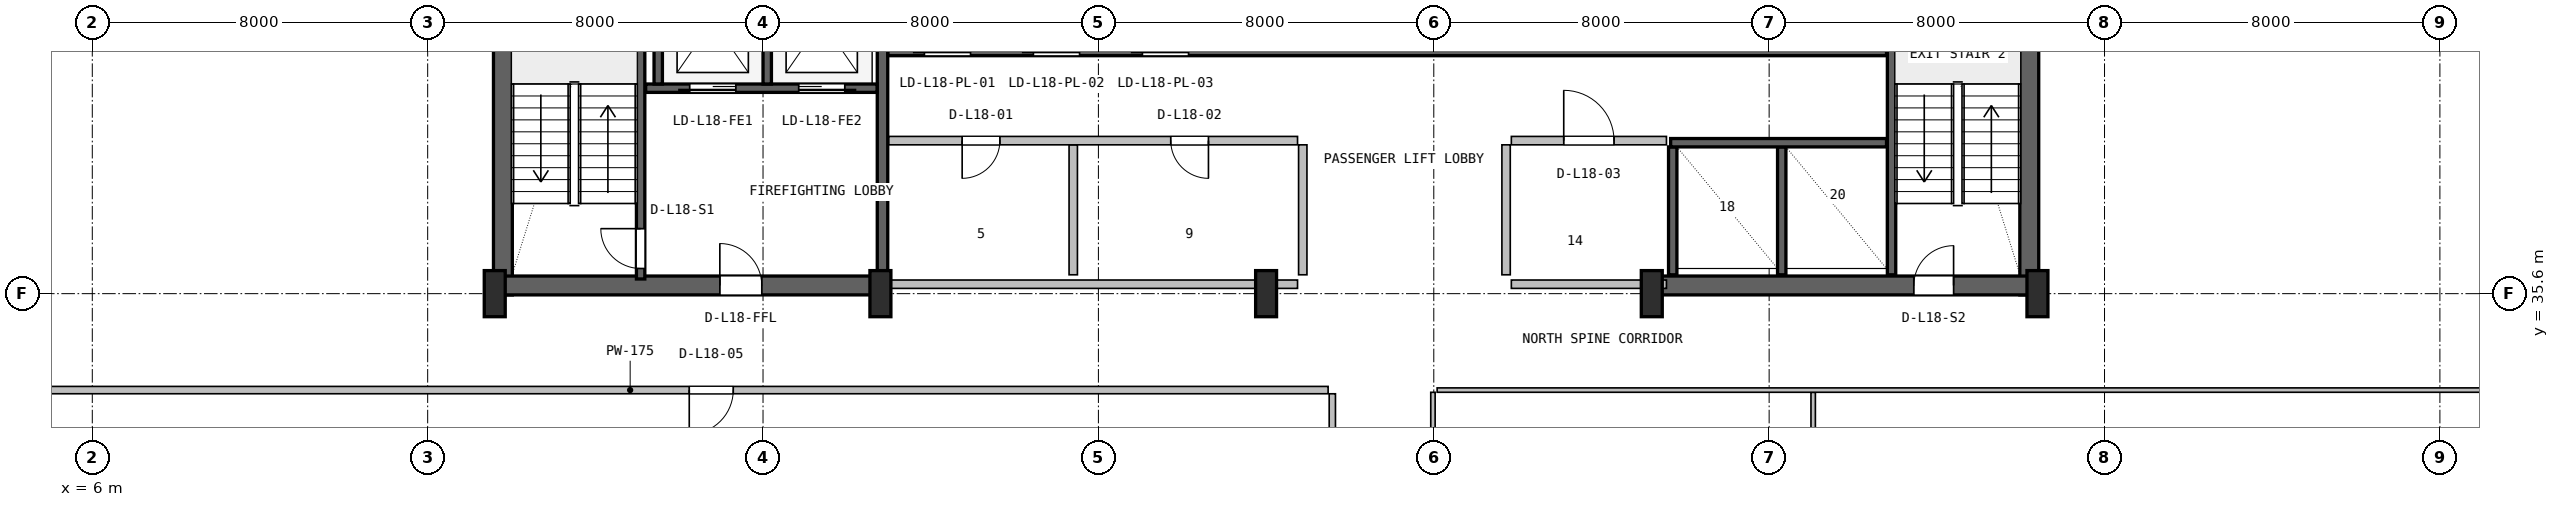
"""IFC4 building model, lengths in metres.
Left out: names, types, materials, properties, quantities, classifications, styles, units other than length and angle.
Written with IfcOpenShell. Run it as: python <this file> out.ifc"""

import sys

from ifc_helpers import new_model, si_unit, direction, frame, frame_2d, origin, origin_2d, place, context, subcontext, project, spatial, rectangle, i_section, extrude, source, transform, mapped, element, fill, save


model = new_model("IFC4")
c1 = context("Model", 3, precision=1e-05, world=origin(), true_north=direction((0.0, 1.0)))
c2 = subcontext(c1, "Body", "Model", "MODEL_VIEW")
j1 = project(units=[si_unit("LENGTHUNIT", "METRE"), si_unit("PLANEANGLEUNIT", "RADIAN")], contexts=[c1])
p1 = place(None, origin())
s1 = spatial("IfcSite", under=j1, at=p1, CompositionType="ELEMENT")
p2 = place(p1, origin())
s2 = spatial("IfcBuilding", under=s1, at=p2, CompositionType="ELEMENT")
p3 = place(p2, frame((0.0, 0.0, 78.3)))
s3 = spatial("IfcBuildingStorey", under=s2, at=p3, CompositionType="ELEMENT", Elevation=78.3)
for number, where, z_axis, x_axis in (
    (1, (15.795, 35.57, 0.0), (0.0, 0.0, 1.0), (0.0, 1.0, 0.0)),
    (2, (52.205, 35.57, 0.0), (0.0, 0.0, 1.0), (0.0, 1.0, 0.0)),
):
    element("IfcWall", number, at=place(p3, frame(where, z_axis=z_axis, x_axis=x_axis)), inside=s3, PredefinedType="SHEAR", context=c2, shape_type="SweptSolid", body=[
        extrude(rectangle(XDim=11.23, YDim=0.45, at=frame_2d((5.615, 0.0))), origin(), (0.0, 0.0, 1.0), 3.58),
    ])
p4 = place(p3, frame((15.57, 35.795, 0.0), z_axis=(0.0, 0.0, 1.0), x_axis=(1.0, 0.0, 0.0)))
e3 = element("IfcWall", 3, at=p4, inside=s3, PredefinedType="SHEAR", context=c2, shape_type="SweptSolid", body=[
    extrude(rectangle(XDim=9.23, YDim=0.45, at=frame_2d((4.615, 0.0))), origin(), (0.0, 0.0, 1.0), 3.58),
])
p5 = place(p4, frame((5.4, 0.0, 0.0)))
e4 = element("IfcOpeningElement", 4, at=p5, cuts=e3, PredefinedType="OPENING", context=c2, shape_type="SweptSolid", body=[
    extrude(rectangle(XDim=1.0, YDim=2.1, at=frame_2d((0.5, 1.05))), frame((0.0, 0.235, 0.0), z_axis=(0.0, -1.0, 0.0), x_axis=(1.0, 0.0, 0.0)), (0.0, 0.0, 1.0), 0.47),
])
p6 = place(p3, frame((43.2, 35.795, 0.0), z_axis=(0.0, 0.0, 1.0), x_axis=(1.0, 0.0, 0.0)))
e5 = element("IfcWall", 5, at=p6, inside=s3, PredefinedType="SHEAR", context=c2, shape_type="SweptSolid", body=[
    extrude(rectangle(XDim=9.23, YDim=0.45, at=frame_2d((4.615, 0.0))), origin(), (0.0, 0.0, 1.0), 3.58),
])
p7 = place(p6, frame((6.25, 0.0, 0.0)))
e6 = element("IfcOpeningElement", 6, at=p7, cuts=e5, PredefinedType="OPENING", context=c2, shape_type="SweptSolid", body=[
    extrude(rectangle(XDim=0.95, YDim=2.1, at=frame_2d((0.475, 1.05))), frame((0.0, 0.235, 0.0), z_axis=(0.0, -1.0, 0.0), x_axis=(1.0, 0.0, 0.0)), (0.0, 0.0, 1.0), 0.47),
])
m1 = source(origin(), c2, "Body", "SweptSolid", [
    extrude(i_section(OverallWidth=0.5, OverallDepth=1.1, WebThickness=0.018, FlangeThickness=0.032, FilletRadius=0.018, at=origin_2d()), origin(), (0.0, 0.0, 1.0), 3.9),
])
for number, where, z_axis, x_axis in (
    (7, (15.6, 35.6, 0.0), (0.0, 0.0, 1.0), (1.0, 0.0, 0.0)),
    (8, (24.8, 35.6, 0.0), (0.0, 0.0, 1.0), (1.0, 0.0, 0.0)),
    (9, (34.0, 35.6, 0.0), (0.0, 0.0, 1.0), (1.0, 0.0, 0.0)),
    (10, (43.2, 35.6, 0.0), (0.0, 0.0, 1.0), (1.0, 0.0, 0.0)),
    (11, (52.4, 35.6, 0.0), (0.0, 0.0, 1.0), (1.0, 0.0, 0.0)),
):
    element("IfcColumn", number, at=place(p3, frame(where, z_axis=z_axis, x_axis=x_axis)), inside=s3, PredefinedType="COLUMN", context=c2, shape_type="MappedRepresentation", body=[
        mapped(m1, transform((0.0, 0.0, 0.0), x_axis=(1.0, 0.0, 0.0), y_axis=(0.0, 1.0, 0.0), z_axis=(0.0, 0.0, 1.0), scale=1.0)),
    ])
p8 = place(p3, frame((19.08, 35.95, 0.0), z_axis=(0.0, 0.0, 1.0), x_axis=(0.0, 1.0, 0.0)))
e12 = element("IfcWall", 12, at=p8, inside=s3, PredefinedType="SHEAR", context=c2, shape_type="SweptSolid", body=[
    extrude(rectangle(XDim=9.65, YDim=0.2, at=frame_2d((4.825, 0.0))), origin(), (0.0, 0.0, 1.0), 3.58),
])
p9 = place(p8, frame((0.25, 0.0, 0.0)))
e13 = element("IfcOpeningElement", 13, at=p9, cuts=e12, PredefinedType="OPENING", context=c2, shape_type="SweptSolid", body=[
    extrude(rectangle(XDim=0.95, YDim=2.1, at=frame_2d((0.475, 1.05))), frame((0.0, 0.11, 0.0), z_axis=(0.0, -1.0, 0.0), x_axis=(1.0, 0.0, 0.0)), (0.0, 0.0, 1.0), 0.22),
])
p10 = place(p3, frame((24.85, 36.05, 0.0), z_axis=(0.0, 0.0, 1.0), x_axis=(0.0, 1.0, 0.0)))
e14 = element("IfcWall", 14, at=p10, inside=s3, PredefinedType="SHEAR", context=c2, shape_type="SweptSolid", body=[
    extrude(rectangle(XDim=10.45, YDim=0.25, at=frame_2d((5.225, 0.0))), origin(), (0.0, 0.0, 1.0), 3.58),
])
p11 = place(p3, frame((19.2, 40.5, 0.0), z_axis=(0.0, 0.0, 1.0), x_axis=(1.0, 0.0, 0.0)))
e15 = element("IfcWall", 15, at=p11, inside=s3, PredefinedType="SHEAR", context=c2, shape_type="SweptSolid", body=[
    extrude(rectangle(XDim=5.52, YDim=0.2, at=frame_2d((2.76, 0.0))), origin(), (0.0, 0.0, 1.0), 3.58),
])
p12 = place(p11, frame((1.05, 0.0, 0.0)))
e16 = element("IfcOpeningElement", 16, at=p12, cuts=e15, PredefinedType="OPENING", context=c2, shape_type="SweptSolid", body=[
    extrude(rectangle(XDim=1.1, YDim=2.18, at=frame_2d((0.55, 1.09))), frame((0.0, 0.11, 0.0), z_axis=(0.0, -1.0, 0.0), x_axis=(1.0, 0.0, 0.0)), (0.0, 0.0, 1.0), 0.22),
])
p13 = place(p11, frame((3.65, 0.0, 0.0)))
e17 = element("IfcOpeningElement", 17, at=p13, cuts=e15, PredefinedType="OPENING", context=c2, shape_type="SweptSolid", body=[
    extrude(rectangle(XDim=1.1, YDim=2.18, at=frame_2d((0.55, 1.09))), frame((0.0, 0.11, 0.0), z_axis=(0.0, -1.0, 0.0), x_axis=(1.0, 0.0, 0.0)), (0.0, 0.0, 1.0), 0.22),
])
p14 = place(p3, frame((22.1, 40.6, 0.0), z_axis=(0.0, 0.0, 1.0), x_axis=(0.0, 1.0, 0.0)))
e18 = element("IfcWall", 18, at=p14, inside=s3, PredefinedType="SHEAR", context=c2, shape_type="SweptSolid", body=[
    extrude(rectangle(XDim=3.0, YDim=0.2, at=frame_2d((1.5, 0.0))), origin(), (0.0, 0.0, 1.0), 3.58),
])
p15 = place(p3, frame((19.5, 40.6, 0.0), z_axis=(0.0, 0.0, 1.0), x_axis=(0.0, 1.0, 0.0)))
e19 = element("IfcWall", 19, at=p15, inside=s3, PredefinedType="SHEAR", context=c2, shape_type="SweptSolid", body=[
    extrude(rectangle(XDim=5.95, YDim=0.2, at=frame_2d((2.975, 0.0))), origin(), (0.0, 0.0, 1.0), 3.58),
])
p16 = place(p3, frame((48.92, 36.05, 0.0), z_axis=(0.0, 0.0, 1.0), x_axis=(0.0, 1.0, 0.0)))
e20 = element("IfcWall", 20, at=p16, inside=s3, PredefinedType="SHEAR", context=c2, shape_type="SweptSolid", body=[
    extrude(rectangle(XDim=10.5, YDim=0.2, at=frame_2d((5.25, 0.0))), origin(), (0.0, 0.0, 1.0), 3.58),
])
p17 = place(p3, frame((24.98, 41.4, 0.0), z_axis=(0.0, 0.0, 1.0), x_axis=(1.0, 0.0, 0.0)))
e21 = element("IfcWall", 21, at=p17, inside=s3, PredefinedType="SHEAR", context=c2, shape_type="SweptSolid", body=[
    extrude(rectangle(XDim=23.82, YDim=0.25, at=frame_2d((11.91, 0.0))), origin(), (0.0, 0.0, 1.0), 3.58),
])
p18 = place(p17, frame((0.87, 0.0, 0.0)))
e22 = element("IfcOpeningElement", 22, at=p18, cuts=e21, PredefinedType="OPENING", context=c2, shape_type="SweptSolid", body=[
    extrude(rectangle(XDim=1.1, YDim=2.18, at=frame_2d((0.55, 1.09))), frame((0.0, 0.135, 0.0), z_axis=(0.0, -1.0, 0.0), x_axis=(1.0, 0.0, 0.0)), (0.0, 0.0, 1.0), 0.27),
])
p19 = place(p17, frame((3.47, 0.0, 0.0)))
e23 = element("IfcOpeningElement", 23, at=p19, cuts=e21, PredefinedType="OPENING", context=c2, shape_type="SweptSolid", body=[
    extrude(rectangle(XDim=1.1, YDim=2.18, at=frame_2d((0.55, 1.09))), frame((0.0, 0.135, 0.0), z_axis=(0.0, -1.0, 0.0), x_axis=(1.0, 0.0, 0.0)), (0.0, 0.0, 1.0), 0.27),
])
p20 = place(p17, frame((6.07, 0.0, 0.0)))
e24 = element("IfcOpeningElement", 24, at=p20, cuts=e21, PredefinedType="OPENING", context=c2, shape_type="SweptSolid", body=[
    extrude(rectangle(XDim=1.1, YDim=2.18, at=frame_2d((0.55, 1.09))), frame((0.0, 0.135, 0.0), z_axis=(0.0, -1.0, 0.0), x_axis=(1.0, 0.0, 0.0)), (0.0, 0.0, 1.0), 0.27),
])
for number, where, z_axis, x_axis in (
    (25, (43.7, 36.05, 0.0), (0.0, 0.0, 1.0), (0.0, 1.0, 0.0)),
    (26, (46.3, 36.05, 0.0), (0.0, 0.0, 1.0), (0.0, 1.0, 0.0)),
):
    element("IfcWall", number, at=place(p3, frame(where, z_axis=z_axis, x_axis=x_axis)), inside=s3, PredefinedType="SHEAR", context=c2, shape_type="SweptSolid", body=[
        extrude(rectangle(XDim=3.05, YDim=0.2, at=frame_2d((1.525, 0.0))), origin(), (0.0, 0.0, 1.0), 3.58),
    ])
p21 = place(p3, frame((43.65, 39.2, 0.0), z_axis=(0.0, 0.0, 1.0), x_axis=(1.0, 0.0, 0.0)))
e27 = element("IfcWall", 27, at=p21, inside=s3, PredefinedType="SHEAR", context=c2, shape_type="SweptSolid", body=[
    extrude(rectangle(XDim=5.15, YDim=0.2, at=frame_2d((2.575, 0.0))), origin(), (0.0, 0.0, 1.0), 3.58),
])
p22 = place(p3, frame((25.0, 35.825, 0.0), z_axis=(0.0, 0.0, 1.0), x_axis=(1.0, 0.0, 0.0)))
e28 = element("IfcWall", 28, at=p22, inside=s3, PredefinedType="PLUMBINGWALL", context=c2, shape_type="SweptSolid", body=[
    extrude(rectangle(XDim=9.75, YDim=0.2, at=frame_2d((4.875, 0.0))), origin(), (0.0, 0.0, 1.0), 2.355),
])
p23 = place(p3, frame((29.4, 36.05, 0.0), z_axis=(0.0, 0.0, 1.0), x_axis=(0.0, 1.0, 0.0)))
e29 = element("IfcWall", 29, at=p23, inside=s3, PredefinedType="PLUMBINGWALL", context=c2, shape_type="SweptSolid", body=[
    extrude(rectangle(XDim=3.1, YDim=0.2, at=frame_2d((1.55, 0.0))), origin(), (0.0, 0.0, 1.0), 3.56),
])
p24 = place(p3, frame((25.0, 39.25, 0.0), z_axis=(0.0, 0.0, 1.0), x_axis=(1.0, 0.0, 0.0)))
e30 = element("IfcWall", 30, at=p24, inside=s3, PredefinedType="PLUMBINGWALL", context=c2, shape_type="SweptSolid", body=[
    extrude(rectangle(XDim=9.75, YDim=0.2, at=frame_2d((4.875, 0.0))), origin(), (0.0, 0.0, 1.0), 3.56),
])
p25 = place(p24, frame((1.75, 0.0, 0.0)))
e31 = element("IfcOpeningElement", 31, at=p25, cuts=e30, PredefinedType="OPENING", context=c2, shape_type="SweptSolid", body=[
    extrude(rectangle(XDim=0.9, YDim=2.06, at=frame_2d((0.45, 1.03))), frame((0.0, 0.11, 0.0), z_axis=(0.0, -1.0, 0.0), x_axis=(1.0, 0.0, 0.0)), (0.0, 0.0, 1.0), 0.22),
])
p26 = place(p24, frame((6.725, 0.0, 0.0)))
e32 = element("IfcOpeningElement", 32, at=p26, cuts=e30, PredefinedType="OPENING", context=c2, shape_type="SweptSolid", body=[
    extrude(rectangle(XDim=0.9, YDim=2.06, at=frame_2d((0.45, 1.03))), frame((0.0, 0.11, 0.0), z_axis=(0.0, -1.0, 0.0), x_axis=(1.0, 0.0, 0.0)), (0.0, 0.0, 1.0), 0.22),
])
p27 = place(p3, frame((34.875, 36.05, 0.0), z_axis=(0.0, 0.0, 1.0), x_axis=(0.0, 1.0, 0.0)))
e33 = element("IfcWall", 33, at=p27, inside=s3, PredefinedType="PLUMBINGWALL", context=c2, shape_type="SweptSolid", body=[
    extrude(rectangle(XDim=3.1, YDim=0.2, at=frame_2d((1.55, 0.0))), origin(), (0.0, 0.0, 1.0), 3.56),
])
p28 = place(p3, frame((39.85, 35.825, 0.0), z_axis=(0.0, 0.0, 1.0), x_axis=(1.0, 0.0, 0.0)))
e34 = element("IfcWall", 34, at=p28, inside=s3, PredefinedType="SOLIDWALL", context=c2, shape_type="SweptSolid", body=[
    extrude(rectangle(XDim=3.7, YDim=0.2, at=frame_2d((1.85, 0.0))), origin(), (0.0, 0.0, 1.0), 2.355),
])
p29 = place(p3, frame((39.85, 39.25, 0.0), z_axis=(0.0, 0.0, 1.0), x_axis=(1.0, 0.0, 0.0)))
e35 = element("IfcWall", 35, at=p29, inside=s3, PredefinedType="SOLIDWALL", context=c2, shape_type="SweptSolid", body=[
    extrude(rectangle(XDim=3.7, YDim=0.2, at=frame_2d((1.85, 0.0))), origin(), (0.0, 0.0, 1.0), 3.56),
])
p30 = place(p29, frame((1.25, 0.0, 0.0)))
e36 = element("IfcOpeningElement", 36, at=p30, cuts=e35, PredefinedType="OPENING", context=c2, shape_type="SweptSolid", body=[
    extrude(rectangle(XDim=1.2, YDim=2.1, at=frame_2d((0.6, 1.05))), frame((0.0, 0.11, 0.0), z_axis=(0.0, -1.0, 0.0), x_axis=(1.0, 0.0, 0.0)), (0.0, 0.0, 1.0), 0.22),
])
p31 = place(p3, frame((39.725, 36.05, 0.0), z_axis=(0.0, 0.0, 1.0), x_axis=(0.0, 1.0, 0.0)))
e37 = element("IfcWall", 37, at=p31, inside=s3, PredefinedType="SOLIDWALL", context=c2, shape_type="SweptSolid", body=[
    extrude(rectangle(XDim=3.1, YDim=0.2, at=frame_2d((1.55, 0.0))), origin(), (0.0, 0.0, 1.0), 3.56),
])
p32 = place(p3, frame((35.58, 1.38, 0.0), z_axis=(0.0, 0.0, 1.0), x_axis=(0.0, 1.0, 0.0)))
e38 = element("IfcWall", 38, at=p32, inside=s3, PredefinedType="PARTITIONING", context=c2, shape_type="SweptSolid", body=[
    extrude(rectangle(XDim=31.832, YDim=0.15, at=frame_2d((15.916, 0.0))), origin(), (0.0, 0.0, 1.0), 2.782),
])
p33 = place(p32, frame((9.985, 0.0, 0.0)))
e39 = element("IfcOpeningElement", 39, at=p33, cuts=e38, PredefinedType="OPENING", context=c2, shape_type="SweptSolid", body=[
    extrude(rectangle(XDim=0.92, YDim=2.08, at=frame_2d((0.46, 1.04))), frame((0.0, 0.085, 0.0), z_axis=(0.0, -1.0, 0.0), x_axis=(1.0, 0.0, 0.0)), (0.0, 0.0, 1.0), 0.17),
])
p34 = place(p3, frame((2.18, 33.3, 0.0), z_axis=(0.0, 0.0, 1.0), x_axis=(1.0, 0.0, 0.0)))
e40 = element("IfcWall", 40, at=p34, inside=s3, PredefinedType="PARTITIONING", context=c2, shape_type="SweptSolid", body=[
    extrude(rectangle(XDim=33.3, YDim=0.175, at=frame_2d((16.65, 0.0))), origin(), (0.0, 0.0, 1.0), 2.782),
])
p35 = place(p34, frame((18.06, 0.0, 0.0)))
e41 = element("IfcOpeningElement", 41, at=p35, cuts=e40, PredefinedType="OPENING", context=c2, shape_type="SweptSolid", body=[
    extrude(rectangle(XDim=1.05, YDim=2.1, at=frame_2d((0.525, 1.05))), frame((0.0, 0.098, 0.0), z_axis=(0.0, -1.0, 0.0), x_axis=(1.0, 0.0, 0.0)), (0.0, 0.0, 1.0), 0.195),
])
p36 = place(p3, frame((47.05, 16.912, 0.0), z_axis=(0.0, 0.0, 1.0), x_axis=(0.0, 1.0, 0.0)))
e42 = element("IfcWall", 42, at=p36, inside=s3, PredefinedType="PARTITIONING", context=c2, shape_type="SweptSolid", body=[
    extrude(rectangle(XDim=16.335, YDim=0.105, at=frame_2d((8.167, 0.0))), origin(), (0.0, 0.0, 1.0), 3.252),
])
p37 = place(p3, frame((38.08, 33.3, 0.0), z_axis=(0.0, 0.0, 1.0), x_axis=(1.0, 0.0, 0.0)))
e43 = element("IfcWall", 43, at=p37, inside=s3, PredefinedType="PARTITIONING", context=c2, shape_type="SweptSolid", body=[
    extrude(rectangle(XDim=27.74, YDim=0.105, at=frame_2d((13.87, 0.0))), origin(), (0.0, 0.0, 1.0), 2.782),
])
p38 = place(p3, frame((37.98, 16.912, 0.0), z_axis=(0.0, 0.0, 1.0), x_axis=(0.0, 1.0, 0.0)))
e44 = element("IfcWall", 44, at=p38, inside=s3, PredefinedType="PARTITIONING", context=c2, shape_type="SweptSolid", body=[
    extrude(rectangle(XDim=16.335, YDim=0.105, at=frame_2d((8.167, 0.0))), origin(), (0.0, 0.0, 1.0), 2.782),
])
p39 = place(p38, frame((7.728, 0.0, 0.0)))
e45 = element("IfcOpeningElement", 45, at=p39, cuts=e44, PredefinedType="OPENING", context=c2, shape_type="SweptSolid", body=[
    extrude(rectangle(XDim=0.88, YDim=2.06, at=frame_2d((0.44, 1.03))), frame((0.0, 0.062, 0.0), z_axis=(0.0, -1.0, 0.0), x_axis=(1.0, 0.0, 0.0)), (0.0, 0.0, 1.0), 0.125),
])
m2 = source(origin(), c2, "Body", "SweptSolid", [
    extrude(rectangle(XDim=0.95, YDim=2.1, at=frame_2d((0.475, 1.05))), frame((0.0, 0.025, 0.0), z_axis=(0.0, -1.0, 0.0), x_axis=(1.0, 0.0, 0.0)), (0.0, 0.0, 1.0), 0.05),
])
p40 = place(p9, origin())
e46 = element("IfcDoor", 46, at=p40, inside=s3, OperationType="SINGLE_SWING_RIGHT", PredefinedType="DOOR", context=c2, shape_type="MappedRepresentation", body=[
    mapped(m2, transform((0.0, 0.0, 0.0), x_axis=(1.0, 0.0, 0.0), y_axis=(0.0, 1.0, 0.0), z_axis=(0.0, 0.0, 1.0), scale=1.0)),
])
fill(e13, e46)
m3 = source(origin(), c2, "Body", "SweptSolid", [
    extrude(rectangle(XDim=1.0, YDim=2.1, at=frame_2d((0.5, 1.05))), frame((0.0, 0.025, 0.0), z_axis=(0.0, -1.0, 0.0), x_axis=(1.0, 0.0, 0.0)), (0.0, 0.0, 1.0), 0.05),
])
p41 = place(p5, origin())
e47 = element("IfcDoor", 47, at=p41, inside=s3, OperationType="SINGLE_SWING_LEFT", PredefinedType="DOOR", context=c2, shape_type="MappedRepresentation", body=[
    mapped(m3, transform((0.0, 0.0, 0.0), x_axis=(1.0, 0.0, 0.0), y_axis=(0.0, 1.0, 0.0), z_axis=(0.0, 0.0, 1.0), scale=1.0)),
])
fill(e4, e47)
m4 = source(origin(), c2, "Body", "SweptSolid", [
    extrude(rectangle(XDim=1.1, YDim=2.18, at=frame_2d((0.55, 1.09))), frame((0.0, 0.025, 0.0), z_axis=(0.0, -1.0, 0.0), x_axis=(1.0, 0.0, 0.0)), (0.0, 0.0, 1.0), 0.05),
])
p42 = place(p12, frame((1.1, 0.0, 0.0), z_axis=(0.0, 0.0, 1.0), x_axis=(-1.0, 0.0, 0.0)))
e48 = element("IfcDoor", 48, at=p42, inside=s3, OperationType="SLIDING_TO_LEFT", PredefinedType="DOOR", context=c2, shape_type="MappedRepresentation", body=[
    mapped(m4, transform((0.0, 0.0, 0.0), x_axis=(1.0, 0.0, 0.0), y_axis=(0.0, 1.0, 0.0), z_axis=(0.0, 0.0, 1.0), scale=1.0)),
])
fill(e16, e48)
p43 = place(p13, frame((1.1, 0.0, 0.0), z_axis=(0.0, 0.0, 1.0), x_axis=(-1.0, 0.0, 0.0)))
e49 = element("IfcDoor", 49, at=p43, inside=s3, OperationType="SLIDING_TO_RIGHT", PredefinedType="DOOR", context=c2, shape_type="MappedRepresentation", body=[
    mapped(m4, transform((0.0, 0.0, 0.0), x_axis=(1.0, 0.0, 0.0), y_axis=(0.0, 1.0, 0.0), z_axis=(0.0, 0.0, 1.0), scale=1.0)),
])
fill(e17, e49)
p44 = place(p7, origin())
e50 = element("IfcDoor", 50, at=p44, inside=s3, OperationType="SINGLE_SWING_RIGHT", PredefinedType="DOOR", context=c2, shape_type="MappedRepresentation", body=[
    mapped(m2, transform((0.0, 0.0, 0.0), x_axis=(1.0, 0.0, 0.0), y_axis=(0.0, 1.0, 0.0), z_axis=(0.0, 0.0, 1.0), scale=1.0)),
])
fill(e6, e50)
m5 = source(origin(), c2, "Body", "SweptSolid", [
    extrude(rectangle(XDim=0.9, YDim=2.06, at=frame_2d((0.45, 1.03))), frame((0.0, 0.025, 0.0), z_axis=(0.0, -1.0, 0.0), x_axis=(1.0, 0.0, 0.0)), (0.0, 0.0, 1.0), 0.05),
])
p45 = place(p25, frame((0.9, 0.0, 0.0), z_axis=(0.0, 0.0, 1.0), x_axis=(-1.0, 0.0, 0.0)))
e51 = element("IfcDoor", 51, at=p45, inside=s3, OperationType="SINGLE_SWING_LEFT", PredefinedType="DOOR", context=c2, shape_type="MappedRepresentation", body=[
    mapped(m5, transform((0.0, 0.0, 0.0), x_axis=(1.0, 0.0, 0.0), y_axis=(0.0, 1.0, 0.0), z_axis=(0.0, 0.0, 1.0), scale=1.0)),
])
fill(e31, e51)
p46 = place(p26, frame((0.9, 0.0, 0.0), z_axis=(0.0, 0.0, 1.0), x_axis=(-1.0, 0.0, 0.0)))
e52 = element("IfcDoor", 52, at=p46, inside=s3, OperationType="SINGLE_SWING_RIGHT", PredefinedType="DOOR", context=c2, shape_type="MappedRepresentation", body=[
    mapped(m5, transform((0.0, 0.0, 0.0), x_axis=(1.0, 0.0, 0.0), y_axis=(0.0, 1.0, 0.0), z_axis=(0.0, 0.0, 1.0), scale=1.0)),
])
fill(e32, e52)
m6 = source(origin(), c2, "Body", "SweptSolid", [
    extrude(rectangle(XDim=1.2, YDim=2.1, at=frame_2d((0.6, 1.05))), frame((0.0, 0.025, 0.0), z_axis=(0.0, -1.0, 0.0), x_axis=(1.0, 0.0, 0.0)), (0.0, 0.0, 1.0), 0.05),
])
p47 = place(p30, origin())
e53 = element("IfcDoor", 53, at=p47, inside=s3, OperationType="SINGLE_SWING_LEFT", PredefinedType="DOOR", context=c2, shape_type="MappedRepresentation", body=[
    mapped(m6, transform((0.0, 0.0, 0.0), x_axis=(1.0, 0.0, 0.0), y_axis=(0.0, 1.0, 0.0), z_axis=(0.0, 0.0, 1.0), scale=1.0)),
])
fill(e36, e53)
m7 = source(origin(), c2, "Body", "SweptSolid", [
    extrude(rectangle(XDim=1.05, YDim=2.1, at=frame_2d((0.525, 1.05))), frame((0.0, 0.025, 0.0), z_axis=(0.0, -1.0, 0.0), x_axis=(1.0, 0.0, 0.0)), (0.0, 0.0, 1.0), 0.05),
])
p48 = place(p35, frame((1.05, 0.0, 0.0), z_axis=(0.0, 0.0, 1.0), x_axis=(-1.0, 0.0, 0.0)))
e54 = element("IfcDoor", 54, at=p48, inside=s3, OperationType="SINGLE_SWING_LEFT", PredefinedType="DOOR", context=c2, shape_type="MappedRepresentation", body=[
    mapped(m7, transform((0.0, 0.0, 0.0), x_axis=(1.0, 0.0, 0.0), y_axis=(0.0, 1.0, 0.0), z_axis=(0.0, 0.0, 1.0), scale=1.0)),
])
fill(e41, e54)
save(model, sys.argv[1])
